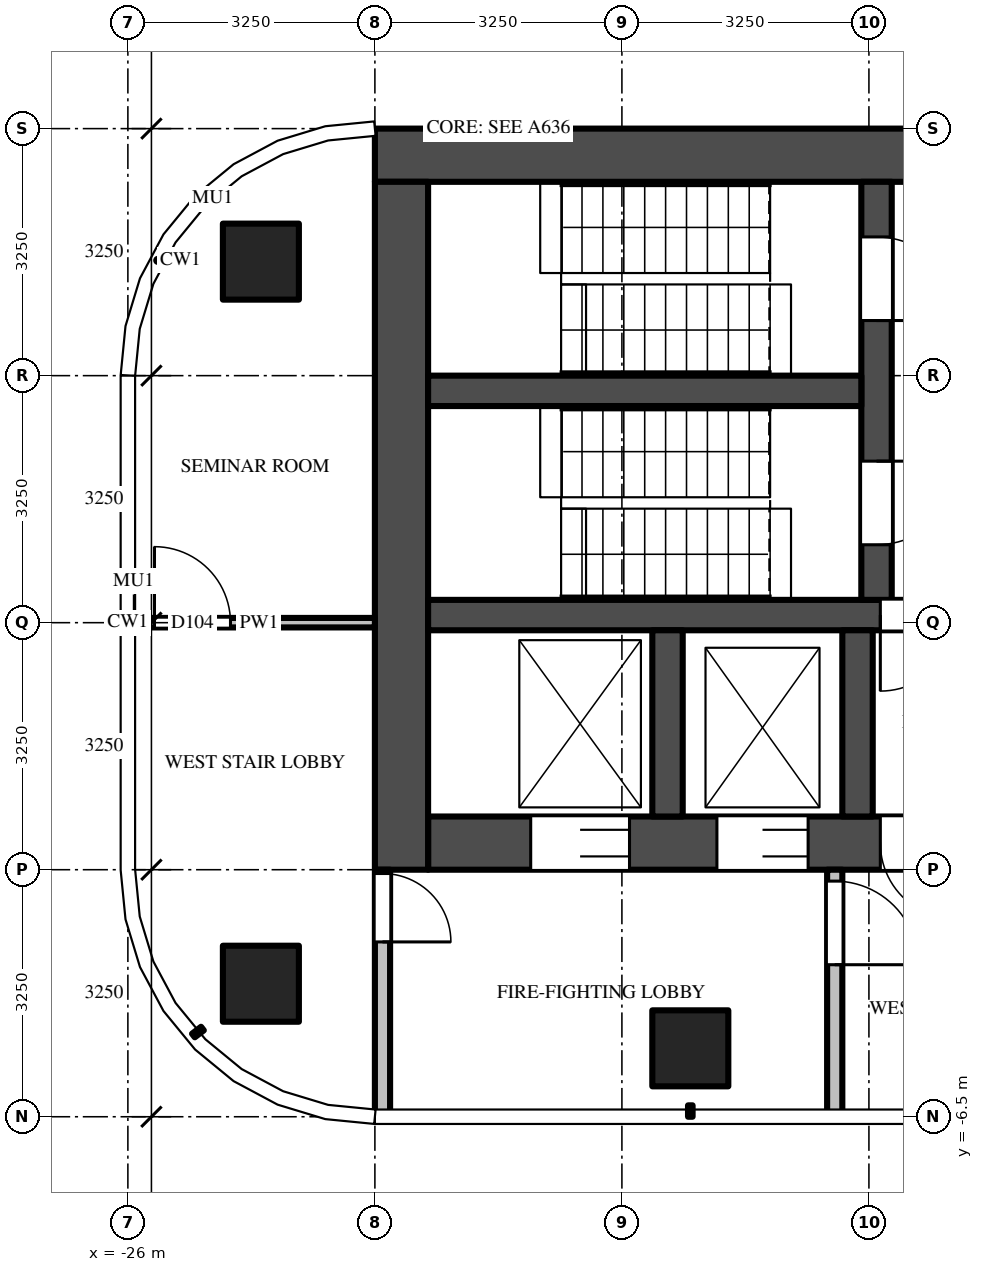
"""IFC4 building model, lengths in metres.
Left out: names, types, materials, properties, quantities, classifications, styles, units other than length and angle.
Written with IfcOpenShell. Run it as: python <this file> out.ifc"""

import sys

from ifc_helpers import new_model, si_unit, direction, frame, frame_2d, origin, origin_2d, place, context, subcontext, project, spatial, rectangle, extrude, source, transform, mapped, element, fill, save


model = new_model("IFC4")
c1 = context("Model", 3, precision=1e-05, world=origin(), true_north=direction((0.0, 1.0)))
c2 = subcontext(c1, "Body", "Model", "MODEL_VIEW")
j1 = project(units=[si_unit("LENGTHUNIT", "METRE"), si_unit("PLANEANGLEUNIT", "RADIAN")], contexts=[c1])
p1 = place(None, origin())
s1 = spatial("IfcSite", under=j1, at=p1, CompositionType="ELEMENT")
p2 = place(p1, origin())
s2 = spatial("IfcBuilding", under=s1, at=p2, CompositionType="ELEMENT")
p3 = place(p2, frame((0.0, 0.0, 287.2)))
s3 = spatial("IfcBuildingStorey", under=s2, at=p3, CompositionType="ELEMENT", Elevation=287.2)
m1 = source(origin(), c2, "Body", "SweptSolid", [
    extrude(rectangle(XDim=1.0, YDim=1.0, at=origin_2d()), origin(), (0.0, 0.0, 1.0), 3.9),
])
for number, where, z_axis, x_axis in (
    (1, (-18.6, -5.6, 0.0), (0.0, 0.0, 1.0), (1.0, 0.0, 0.0)),
    (2, (-24.25, -4.75, 0.0), (0.0, 0.0, 1.0), (1.0, 0.0, 0.0)),
    (3, (-24.25, 4.75, 0.0), (0.0, 0.0, 1.0), (1.0, 0.0, 0.0)),
):
    element("IfcColumn", number, at=place(p3, frame(where, z_axis=z_axis, x_axis=x_axis)), inside=s3, PredefinedType="COLUMN", context=c2, shape_type="MappedRepresentation", body=[
        mapped(m1, transform((0.0, 0.0, 0.0))),
    ])
m2 = source(origin(), c2, "Body", "SweptSolid", [
    extrude(rectangle(XDim=16.65, YDim=0.7, at=frame_2d((8.325, 0.0))), origin(), (0.0, 0.0, 1.0), 3.7),
])
p4 = place(p3, frame((-6.1, 6.15, 0.0), z_axis=(0.0, 0.0, 1.0), x_axis=(-1.0, 0.0, 0.0)))
e4 = element("IfcWall", 4, at=p4, inside=s3, PredefinedType="SHEAR", context=c2, shape_type="MappedRepresentation", body=[
    mapped(m2, transform((0.0, 0.0, 0.0))),
])
m3 = source(origin(), c2, "Body", "SweptSolid", [
    extrude(rectangle(XDim=14.85, YDim=0.7, at=frame_2d((7.425, 0.0))), origin(), (0.0, 0.0, 1.0), 3.7),
])
p5 = place(p3, frame((-7.2, -2.9, 0.0), z_axis=(0.0, 0.0, 1.0), x_axis=(-1.0, 0.0, 0.0)))
e5 = element("IfcWall", 5, at=p5, inside=s3, PredefinedType="SHEAR", context=c2, shape_type="MappedRepresentation", body=[
    mapped(m3, transform((0.0, 0.0, 0.0))),
])
m4 = source(origin(), c2, "Body", "SweptSolid", [
    extrude(rectangle(XDim=1.2, YDim=2.1, at=frame_2d((0.6, 1.05))), frame((0.0, 0.36, 0.0), z_axis=(0.0, -1.0, 0.0), x_axis=(1.0, 0.0, 0.0)), (0.0, 0.0, 1.0), 0.72),
])
p6 = place(p5, frame((5.7, 0.0, 0.0)))
e6 = element("IfcOpeningElement", 6, at=p6, cuts=e5, PredefinedType="OPENING", context=c2, shape_type="MappedRepresentation", body=[
    mapped(m4, transform((0.0, 0.0, 0.0))),
])
m5 = source(origin(), c2, "Body", "SweptSolid", [
    extrude(rectangle(XDim=1.3, YDim=2.1, at=frame_2d((0.65, 1.05))), frame((0.0, 0.36, 0.0), z_axis=(0.0, -1.0, 0.0), x_axis=(1.0, 0.0, 0.0)), (0.0, 0.0, 1.0), 0.72),
])
p7 = place(p5, frame((12.2, 0.0, 0.0)))
e7 = element("IfcOpeningElement", 7, at=p7, cuts=e5, PredefinedType="OPENING", context=c2, shape_type="MappedRepresentation", body=[
    mapped(m5, transform((0.0, 0.0, 0.0))),
])
p8 = place(p5, frame((9.85, 0.0, 0.0)))
e8 = element("IfcOpeningElement", 8, at=p8, cuts=e5, PredefinedType="OPENING", context=c2, shape_type="MappedRepresentation", body=[
    mapped(m4, transform((0.0, 0.0, 0.0))),
])
m6 = source(origin(), c2, "Body", "SweptSolid", [
    extrude(rectangle(XDim=1.0, YDim=2.1, at=frame_2d((0.5, 1.05))), frame((0.0, 0.36, 0.0), z_axis=(0.0, -1.0, 0.0), x_axis=(1.0, 0.0, 0.0)), (0.0, 0.0, 1.0), 0.72),
])
p9 = place(p5, frame((7.9, 0.0, 0.0)))
e9 = element("IfcOpeningElement", 9, at=p9, cuts=e5, PredefinedType="OPENING", context=c2, shape_type="MappedRepresentation", body=[
    mapped(m6, transform((0.0, 0.0, 0.0))),
])
m7 = source(origin(), c2, "Body", "SweptSolid", [
    extrude(rectangle(XDim=0.8, YDim=2.1, at=frame_2d((0.4, 1.05))), frame((0.0, 0.36, 0.0), z_axis=(0.0, -1.0, 0.0), x_axis=(1.0, 0.0, 0.0)), (0.0, 0.0, 1.0), 0.72),
])
p10 = place(p5, frame((0.212, 0.0, 0.0)))
e10 = element("IfcOpeningElement", 10, at=p10, cuts=e5, PredefinedType="OPENING", context=c2, shape_type="MappedRepresentation", body=[
    mapped(m7, transform((0.0, 0.0, 0.0))),
])
p11 = place(p5, frame((2.587, 0.0, 0.0)))
e11 = element("IfcOpeningElement", 11, at=p11, cuts=e5, PredefinedType="OPENING", context=c2, shape_type="MappedRepresentation", body=[
    mapped(m6, transform((0.0, 0.0, 0.0))),
])
m8 = source(origin(), c2, "Body", "SweptSolid", [
    extrude(rectangle(XDim=9.05, YDim=0.7, at=frame_2d((4.525, 0.0))), origin(), (0.0, 0.0, 1.0), 3.7),
])
p12 = place(p3, frame((-22.4, 5.8, 0.0), z_axis=(0.0, 0.0, 1.0), x_axis=(0.0, -1.0, 0.0)))
e12 = element("IfcWall", 12, at=p12, inside=s3, PredefinedType="SHEAR", context=c2, shape_type="MappedRepresentation", body=[
    mapped(m8, transform((0.0, 0.0, 0.0))),
])
m9 = source(origin(), c2, "Body", "SweptSolid", [
    extrude(rectangle(XDim=14.85, YDim=0.4, at=frame_2d((7.425, 0.0))), origin(), (0.0, 0.0, 1.0), 3.7),
])
p13 = place(p3, frame((-7.2, 0.1, 0.0), z_axis=(0.0, 0.0, 1.0), x_axis=(-1.0, 0.0, 0.0)))
e13 = element("IfcWall", 13, at=p13, inside=s3, PredefinedType="SHEAR", context=c2, shape_type="MappedRepresentation", body=[
    mapped(m9, transform((0.0, 0.0, 0.0))),
])
m10 = source(origin(), c2, "Body", "SweptSolid", [
    extrude(rectangle(XDim=1.0, YDim=2.1, at=frame_2d((0.5, 1.05))), frame((0.0, 0.21, 0.0), z_axis=(0.0, -1.0, 0.0), x_axis=(1.0, 0.0, 0.0)), (0.0, 0.0, 1.0), 0.42),
])
p14 = place(p13, frame((7.9, 0.0, 0.0)))
e14 = element("IfcOpeningElement", 14, at=p14, cuts=e13, PredefinedType="OPENING", context=c2, shape_type="MappedRepresentation", body=[
    mapped(m10, transform((0.0, 0.0, 0.0))),
])
m11 = source(origin(), c2, "Body", "SweptSolid", [
    extrude(rectangle(XDim=5.5, YDim=0.4, at=frame_2d((2.75, 0.0))), origin(), (0.0, 0.0, 1.0), 3.7),
])
p15 = place(p3, frame((-16.15, 5.8, 0.0), z_axis=(0.0, 0.0, 1.0), x_axis=(0.0, -1.0, 0.0)))
e15 = element("IfcWall", 15, at=p15, inside=s3, PredefinedType="SHEAR", context=c2, shape_type="MappedRepresentation", body=[
    mapped(m11, transform((0.0, 0.0, 0.0))),
])
m12 = source(origin(), c2, "Body", "SweptSolid", [
    extrude(rectangle(XDim=1.1, YDim=2.1, at=frame_2d((0.55, 1.05))), frame((0.0, 0.21, 0.0), z_axis=(0.0, -1.0, 0.0), x_axis=(1.0, 0.0, 0.0)), (0.0, 0.0, 1.0), 0.42),
])
p16 = place(p15, frame((0.725, 0.0, 0.0)))
e16 = element("IfcOpeningElement", 16, at=p16, cuts=e15, PredefinedType="OPENING", context=c2, shape_type="MappedRepresentation", body=[
    mapped(m12, transform((0.0, 0.0, 0.0))),
])
p17 = place(p15, frame((3.675, 0.0, 0.0)))
e17 = element("IfcOpeningElement", 17, at=p17, cuts=e15, PredefinedType="OPENING", context=c2, shape_type="MappedRepresentation", body=[
    mapped(m12, transform((0.0, 0.0, 0.0))),
])
m13 = source(origin(), c2, "Body", "SweptSolid", [
    extrude(rectangle(XDim=5.7, YDim=0.4, at=frame_2d((2.85, 0.0))), origin(), (0.0, 0.0, 1.0), 3.7),
])
p18 = place(p3, frame((-16.35, 3.05, 0.0), z_axis=(0.0, 0.0, 1.0), x_axis=(-1.0, 0.0, 0.0)))
e18 = element("IfcWall", 18, at=p18, inside=s3, PredefinedType="SHEAR", context=c2, shape_type="MappedRepresentation", body=[
    mapped(m13, transform((0.0, 0.0, 0.0))),
])
m14 = source(origin(), c2, "Body", "SweptSolid", [
    extrude(rectangle(XDim=2.45, YDim=0.4, at=frame_2d((1.225, 0.0))), origin(), (0.0, 0.0, 1.0), 3.7),
])
for number, where, z_axis, x_axis in (
    (19, (-16.4, -0.1, 0.0), (0.0, 0.0, 1.0), (0.0, -1.0, 0.0)),
    (20, (-18.9, -0.1, 0.0), (0.0, 0.0, 1.0), (0.0, -1.0, 0.0)),
):
    element("IfcWall", number, at=place(p3, frame(where, z_axis=z_axis, x_axis=x_axis)), inside=s3, PredefinedType="SHEAR", context=c2, shape_type="MappedRepresentation", body=[
        mapped(m14, transform((0.0, 0.0, 0.0))),
    ])
m15 = source(origin(), c2, "Body", "SweptSolid", [
    extrude(rectangle(XDim=3.25, YDim=0.2, at=frame_2d((1.625, 0.0))), origin(), (0.0, 0.0, 1.0), 3.7),
])
p19 = place(p3, frame((-16.7, -3.25, 0.0), z_axis=(0.0, 0.0, 1.0), x_axis=(0.0, -1.0, 0.0)))
e21 = element("IfcWall", 21, at=p19, inside=s3, PredefinedType="PARTITIONING", context=c2, shape_type="MappedRepresentation", body=[
    mapped(m15, transform((0.0, 0.0, 0.0))),
])
m16 = source(origin(), c2, "Body", "SweptSolid", [
    extrude(rectangle(XDim=1.1, YDim=2.1, at=frame_2d((0.55, 1.05))), frame((0.0, 0.11, 0.0), z_axis=(0.0, -1.0, 0.0), x_axis=(1.0, 0.0, 0.0)), (0.0, 0.0, 1.0), 0.22),
])
p20 = place(p19, frame((0.15, 0.0, 0.0)))
e22 = element("IfcOpeningElement", 22, at=p20, cuts=e21, PredefinedType="OPENING", context=c2, shape_type="MappedRepresentation", body=[
    mapped(m16, transform((0.0, 0.0, 0.0))),
])
p21 = place(p3, frame((-22.65, -3.25, 0.0), z_axis=(0.0, 0.0, 1.0), x_axis=(0.0, -1.0, 0.0)))
e23 = element("IfcWall", 23, at=p21, inside=s3, PredefinedType="PARTITIONING", context=c2, shape_type="MappedRepresentation", body=[
    mapped(m15, transform((0.0, 0.0, 0.0))),
])
m17 = source(origin(), c2, "Body", "SweptSolid", [
    extrude(rectangle(XDim=0.9, YDim=2.1, at=frame_2d((0.45, 1.05))), frame((0.0, 0.11, 0.0), z_axis=(0.0, -1.0, 0.0), x_axis=(1.0, 0.0, 0.0)), (0.0, 0.0, 1.0), 0.22),
])
p22 = place(p21, frame((0.05, 0.0, 0.0)))
e24 = element("IfcOpeningElement", 24, at=p22, cuts=e23, PredefinedType="OPENING", context=c2, shape_type="MappedRepresentation", body=[
    mapped(m17, transform((0.0, 0.0, 0.0))),
])
m18 = source(origin(), c2, "Body", "SweptSolid", [
    extrude(rectangle(XDim=3.05, YDim=0.125, at=frame_2d((1.525, 0.0))), origin(), (0.0, 0.0, 1.0), 2.78),
])
p23 = place(p3, frame((-25.8, 0.0, 0.0), z_axis=(0.0, 0.0, 1.0), x_axis=(1.0, 0.0, 0.0)))
e25 = element("IfcWall", 25, at=p23, inside=s3, PredefinedType="PARTITIONING", context=c2, shape_type="MappedRepresentation", body=[
    mapped(m18, transform((0.0, 0.0, 0.0))),
])
m19 = source(origin(), c2, "Body", "SweptSolid", [
    extrude(rectangle(XDim=1.0, YDim=2.1, at=frame_2d((0.5, 1.05))), frame((0.0, 0.073, 0.0), z_axis=(0.0, -1.0, 0.0), x_axis=(1.0, 0.0, 0.0)), (0.0, 0.0, 1.0), 0.145),
])
p24 = place(p23, frame((0.15, 0.0, 0.0)))
e26 = element("IfcOpeningElement", 26, at=p24, cuts=e25, PredefinedType="OPENING", context=c2, shape_type="MappedRepresentation", body=[
    mapped(m19, transform((0.0, 0.0, 0.0))),
])
m20 = source(origin(), c2, "Body", "SweptSolid", [
    extrude(rectangle(XDim=1.3, YDim=2.1, at=frame_2d((0.65, 1.05))), frame((0.0, -0.275, 0.0), z_axis=(0.0, -1.0, 0.0), x_axis=(1.0, 0.0, 0.0)), (0.0, 0.0, 1.0), 0.05),
])
p25 = place(p7, origin())
e27 = element("IfcDoor", 27, at=p25, inside=s3, OperationType="DOUBLE_DOOR_SLIDING", PredefinedType="DOOR", context=c2, shape_type="MappedRepresentation", body=[
    mapped(m20, transform((0.0, 0.0, 0.0))),
])
fill(e7, e27)
m21 = source(origin(), c2, "Body", "SweptSolid", [
    extrude(rectangle(XDim=1.2, YDim=2.1, at=frame_2d((0.6, 1.05))), frame((0.0, -0.275, 0.0), z_axis=(0.0, -1.0, 0.0), x_axis=(1.0, 0.0, 0.0)), (0.0, 0.0, 1.0), 0.05),
])
p26 = place(p8, origin())
e28 = element("IfcDoor", 28, at=p26, inside=s3, OperationType="DOUBLE_DOOR_SLIDING", PredefinedType="DOOR", context=c2, shape_type="MappedRepresentation", body=[
    mapped(m21, transform((0.0, 0.0, 0.0))),
])
fill(e8, e28)
m22 = source(origin(), c2, "Body", "SweptSolid", [
    extrude(rectangle(XDim=1.1, YDim=2.1, at=frame_2d((0.55, 1.05))), frame((0.0, 0.025, 0.0), z_axis=(0.0, -1.0, 0.0), x_axis=(1.0, 0.0, 0.0)), (0.0, 0.0, 1.0), 0.05),
])
p27 = place(p16, origin())
e29 = element("IfcDoor", 29, at=p27, inside=s3, OperationType="SINGLE_SWING_RIGHT", PredefinedType="DOOR", context=c2, shape_type="MappedRepresentation", body=[
    mapped(m22, transform((0.0, 0.0, 0.0))),
])
fill(e16, e29)
p28 = place(p17, origin())
e30 = element("IfcDoor", 30, at=p28, inside=s3, OperationType="SINGLE_SWING_LEFT", PredefinedType="DOOR", context=c2, shape_type="MappedRepresentation", body=[
    mapped(m22, transform((0.0, 0.0, 0.0))),
])
fill(e17, e30)
m23 = source(origin(), c2, "Body", "SweptSolid", [
    extrude(rectangle(XDim=1.0, YDim=2.1, at=frame_2d((0.5, 1.05))), frame((0.0, 0.025, 0.0), z_axis=(0.0, -1.0, 0.0), x_axis=(1.0, 0.0, 0.0)), (0.0, 0.0, 1.0), 0.05),
])
p29 = place(p14, origin())
e31 = element("IfcDoor", 31, at=p29, inside=s3, OperationType="SINGLE_SWING_RIGHT", PredefinedType="DOOR", context=c2, shape_type="MappedRepresentation", body=[
    mapped(m23, transform((0.0, 0.0, 0.0))),
])
fill(e14, e31)
m24 = source(origin(), c2, "Body", "SweptSolid", [
    extrude(rectangle(XDim=1.0, YDim=2.1, at=frame_2d((0.5, 1.05))), frame((0.0, -0.275, 0.0), z_axis=(0.0, -1.0, 0.0), x_axis=(1.0, 0.0, 0.0)), (0.0, 0.0, 1.0), 0.05),
])
p30 = place(p9, origin())
e32 = element("IfcDoor", 32, at=p30, inside=s3, OperationType="SINGLE_SWING_LEFT", PredefinedType="DOOR", context=c2, shape_type="MappedRepresentation", body=[
    mapped(m24, transform((0.0, 0.0, 0.0))),
])
fill(e9, e32)
p31 = place(p20, origin())
e33 = element("IfcDoor", 33, at=p31, inside=s3, OperationType="SINGLE_SWING_RIGHT", PredefinedType="DOOR", context=c2, shape_type="MappedRepresentation", body=[
    mapped(m22, transform((0.0, 0.0, 0.0))),
])
fill(e22, e33)
m25 = source(origin(), c2, "Body", "SweptSolid", [
    extrude(rectangle(XDim=0.9, YDim=2.1, at=frame_2d((0.45, 1.05))), frame((0.0, 0.025, 0.0), z_axis=(0.0, -1.0, 0.0), x_axis=(1.0, 0.0, 0.0)), (0.0, 0.0, 1.0), 0.05),
])
p32 = place(p22, origin())
e34 = element("IfcDoor", 34, at=p32, inside=s3, OperationType="SINGLE_SWING_RIGHT", PredefinedType="DOOR", context=c2, shape_type="MappedRepresentation", body=[
    mapped(m25, transform((0.0, 0.0, 0.0))),
])
fill(e24, e34)
p33 = place(p24, origin())
e35 = element("IfcDoor", 35, at=p33, inside=s3, OperationType="SINGLE_SWING_LEFT", PredefinedType="DOOR", context=c2, shape_type="MappedRepresentation", body=[
    mapped(m23, transform((0.0, 0.0, 0.0))),
])
fill(e26, e35)
save(model, sys.argv[1])
